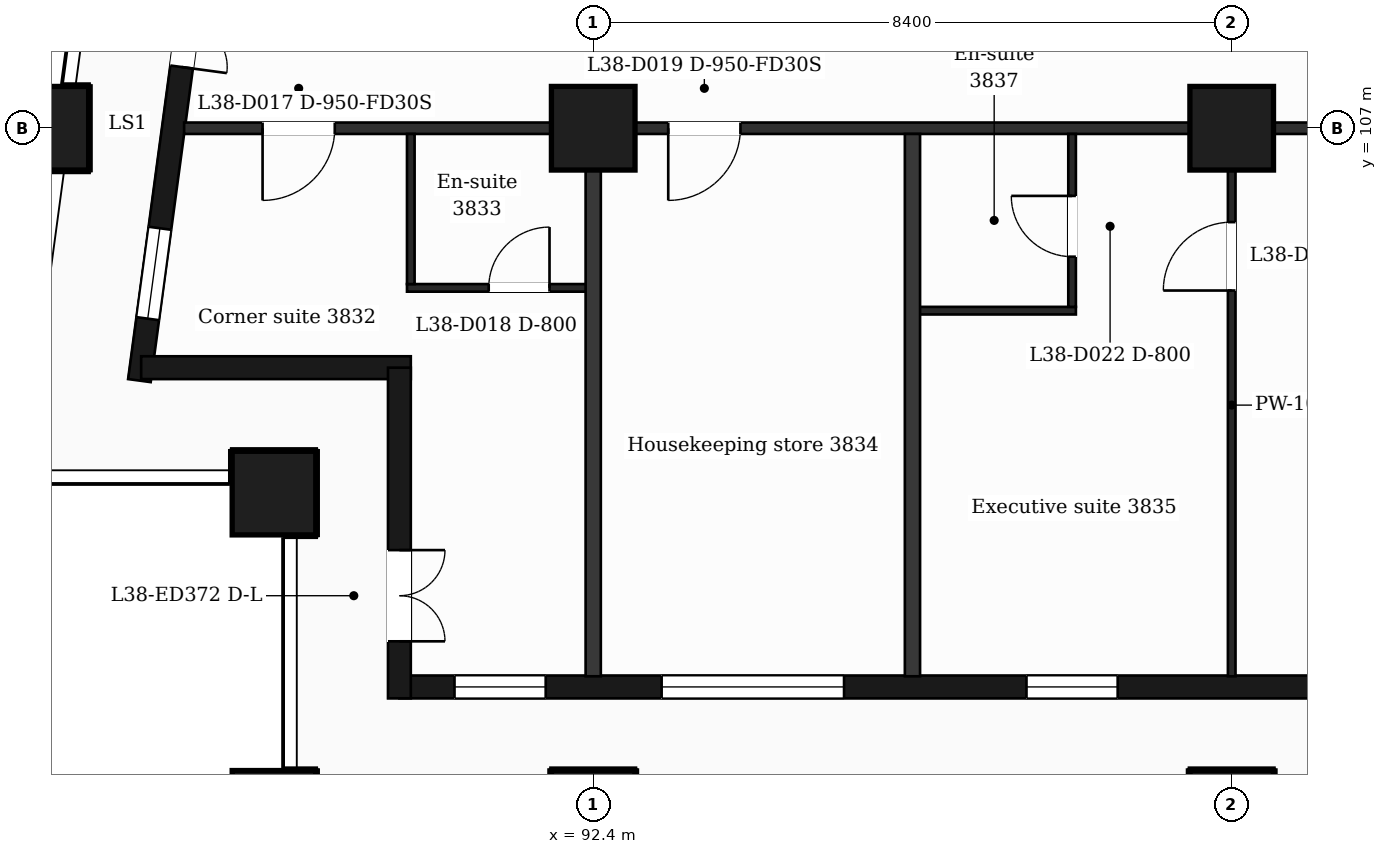
"""IFC4 building model, lengths in metres.
Left out: names, types, materials, properties, quantities, classifications, styles, units other than length and angle.
Written with IfcOpenShell. Run it as: python <this file> out.ifc"""

import sys

from ifc_helpers import new_model, si_unit, direction, frame, frame_2d, origin, origin_2d, place, context, subcontext, project, spatial, rectangle, extrude, element, fill, save


model = new_model("IFC4")
c1 = context("Model", 3, precision=1e-05, world=origin(), true_north=direction((0.0, 1.0)))
c2 = subcontext(c1, "Body", "Model", "MODEL_VIEW")
j1 = project(units=[si_unit("LENGTHUNIT", "METRE"), si_unit("PLANEANGLEUNIT", "RADIAN")], contexts=[c1])
p1 = place(None, origin())
s1 = spatial("IfcSite", under=j1, at=p1, CompositionType="ELEMENT")
p2 = place(p1, origin())
s2 = spatial("IfcBuilding", under=s1, at=p2, CompositionType="ELEMENT")
p3 = place(p2, frame((0.0, 0.0, 162.6)))
s3 = spatial("IfcBuildingStorey", under=s2, at=p3, CompositionType="ELEMENT", Elevation=162.6)
for number, where, z_axis, x_axis in (
    (1, (92.4, 98.0, 0.0), (0.0, 0.0, 1.0), (1.0, 0.0, 0.0)),
    (2, (100.8, 98.0, 0.0), (0.0, 0.0, 1.0), (1.0, 0.0, 0.0)),
    (3, (88.2, 98.0, 0.0), (0.0, 0.0, 1.0), (1.0, 0.0, 0.0)),
    (4, (88.2, 102.2, 0.0), (0.0, 0.0, 1.0), (1.0, 0.0, 0.0)),
    (5, (92.4, 107.0, 0.0), (0.0, 0.0, 1.0), (1.0, 0.0, 0.0)),
    (6, (100.8, 107.0, 0.0), (0.0, 0.0, 1.0), (1.0, 0.0, 0.0)),
    (7, (85.211, 107.0, 0.0), (0.0, 0.0, 1.0), (1.0, 0.0, 0.0)),
):
    element("IfcColumn", number, at=place(p3, frame(where, z_axis=z_axis, x_axis=x_axis)), inside=s3, PredefinedType="COLUMN", context=c2, shape_type="SweptSolid", body=[
        extrude(rectangle(XDim=1.1, YDim=1.1, at=origin_2d()), origin(), (0.0, 0.0, 1.0), 3.7),
    ])
p4 = place(p3, frame((89.85, 99.65, 0.0), z_axis=(0.0, 0.0, 1.0), x_axis=(1.0, 0.0, 0.0)))
e8 = element("IfcWall", 8, at=p4, inside=s3, PredefinedType="SOLIDWALL", context=c2, shape_type="SweptSolid", body=[
    extrude(rectangle(XDim=47.25, YDim=0.3, at=frame_2d((23.625, 0.0))), origin(), (0.0, 0.0, 1.0), 3.38),
])
p5 = place(p4, frame((0.725, 0.0, 0.9)))
e9 = element("IfcOpeningElement", 9, at=p5, cuts=e8, PredefinedType="OPENING", context=c2, shape_type="SweptSolid", body=[
    extrude(rectangle(XDim=1.2, YDim=2.1, at=frame_2d((0.6, 1.05))), frame((0.0, 0.16, 0.0), z_axis=(0.0, -1.0, 0.0), x_axis=(1.0, 0.0, 0.0)), (0.0, 0.0, 1.0), 0.32),
])
p6 = place(p4, frame((3.45, 0.0, 0.9)))
e10 = element("IfcOpeningElement", 10, at=p6, cuts=e8, PredefinedType="OPENING", context=c2, shape_type="SweptSolid", body=[
    extrude(rectangle(XDim=2.4, YDim=2.1, at=frame_2d((1.2, 1.05))), frame((0.0, 0.16, 0.0), z_axis=(0.0, -1.0, 0.0), x_axis=(1.0, 0.0, 0.0)), (0.0, 0.0, 1.0), 0.32),
])
p7 = place(p4, frame((8.25, 0.0, 0.9)))
e11 = element("IfcOpeningElement", 11, at=p7, cuts=e8, PredefinedType="OPENING", context=c2, shape_type="SweptSolid", body=[
    extrude(rectangle(XDim=1.2, YDim=2.1, at=frame_2d((0.6, 1.05))), frame((0.0, 0.16, 0.0), z_axis=(0.0, -1.0, 0.0), x_axis=(1.0, 0.0, 0.0)), (0.0, 0.0, 1.0), 0.32),
])
p8 = place(p4, frame((12.45, 0.0, 0.9)))
e12 = element("IfcOpeningElement", 12, at=p8, cuts=e8, PredefinedType="OPENING", context=c2, shape_type="SweptSolid", body=[
    extrude(rectangle(XDim=1.2, YDim=2.1, at=frame_2d((0.6, 1.05))), frame((0.0, 0.16, 0.0), z_axis=(0.0, -1.0, 0.0), x_axis=(1.0, 0.0, 0.0)), (0.0, 0.0, 1.0), 0.32),
])
p9 = place(p4, frame((16.05, 0.0, 0.9)))
e13 = element("IfcOpeningElement", 13, at=p9, cuts=e8, PredefinedType="OPENING", context=c2, shape_type="SweptSolid", body=[
    extrude(rectangle(XDim=2.4, YDim=2.1, at=frame_2d((1.2, 1.05))), frame((0.0, 0.16, 0.0), z_axis=(0.0, -1.0, 0.0), x_axis=(1.0, 0.0, 0.0)), (0.0, 0.0, 1.0), 0.32),
])
p10 = place(p4, frame((20.25, 0.0, 0.9)))
e14 = element("IfcOpeningElement", 14, at=p10, cuts=e8, PredefinedType="OPENING", context=c2, shape_type="SweptSolid", body=[
    extrude(rectangle(XDim=2.4, YDim=2.1, at=frame_2d((1.2, 1.05))), frame((0.0, 0.16, 0.0), z_axis=(0.0, -1.0, 0.0), x_axis=(1.0, 0.0, 0.0)), (0.0, 0.0, 1.0), 0.32),
])
p11 = place(p4, frame((25.05, 0.0, 0.0)))
e15 = element("IfcOpeningElement", 15, at=p11, cuts=e8, PredefinedType="OPENING", context=c2, shape_type="SweptSolid", body=[
    extrude(rectangle(XDim=1.2, YDim=2.4, at=frame_2d((0.6, 1.2))), frame((0.0, 0.16, 0.0), z_axis=(0.0, -1.0, 0.0), x_axis=(1.0, 0.0, 0.0)), (0.0, 0.0, 1.0), 0.32),
])
p12 = place(p4, frame((28.65, 0.0, 0.9)))
e16 = element("IfcOpeningElement", 16, at=p12, cuts=e8, PredefinedType="OPENING", context=c2, shape_type="SweptSolid", body=[
    extrude(rectangle(XDim=2.4, YDim=2.1, at=frame_2d((1.2, 1.05))), frame((0.0, 0.16, 0.0), z_axis=(0.0, -1.0, 0.0), x_axis=(1.0, 0.0, 0.0)), (0.0, 0.0, 1.0), 0.32),
])
p13 = place(p4, frame((32.85, 0.0, 0.9)))
e17 = element("IfcOpeningElement", 17, at=p13, cuts=e8, PredefinedType="OPENING", context=c2, shape_type="SweptSolid", body=[
    extrude(rectangle(XDim=2.4, YDim=2.1, at=frame_2d((1.2, 1.05))), frame((0.0, 0.16, 0.0), z_axis=(0.0, -1.0, 0.0), x_axis=(1.0, 0.0, 0.0)), (0.0, 0.0, 1.0), 0.32),
])
p14 = place(p4, frame((37.65, 0.0, 0.9)))
e18 = element("IfcOpeningElement", 18, at=p14, cuts=e8, PredefinedType="OPENING", context=c2, shape_type="SweptSolid", body=[
    extrude(rectangle(XDim=1.2, YDim=2.1, at=frame_2d((0.6, 1.05))), frame((0.0, 0.16, 0.0), z_axis=(0.0, -1.0, 0.0), x_axis=(1.0, 0.0, 0.0)), (0.0, 0.0, 1.0), 0.32),
])
p15 = place(p4, frame((41.85, 0.0, 0.9)))
e19 = element("IfcOpeningElement", 19, at=p15, cuts=e8, PredefinedType="OPENING", context=c2, shape_type="SweptSolid", body=[
    extrude(rectangle(XDim=1.2, YDim=2.1, at=frame_2d((0.6, 1.05))), frame((0.0, 0.16, 0.0), z_axis=(0.0, -1.0, 0.0), x_axis=(1.0, 0.0, 0.0)), (0.0, 0.0, 1.0), 0.32),
])
p16 = place(p4, frame((45.25, 0.0, 0.9)))
e20 = element("IfcOpeningElement", 20, at=p16, cuts=e8, PredefinedType="OPENING", context=c2, shape_type="SweptSolid", body=[
    extrude(rectangle(XDim=1.2, YDim=2.1, at=frame_2d((0.6, 1.05))), frame((0.0, 0.16, 0.0), z_axis=(0.0, -1.0, 0.0), x_axis=(1.0, 0.0, 0.0)), (0.0, 0.0, 1.0), 0.32),
])
p17 = place(p3, frame((87.334, 110.4, 0.0), z_axis=(0.0, 0.0, 1.0), x_axis=(-0.133437175554, -0.991057273915, 0.0)))
e21 = element("IfcWall", 21, at=p17, inside=s3, PredefinedType="SOLIDWALL", context=c2, shape_type="SweptSolid", body=[
    extrude(rectangle(XDim=6.781, YDim=0.3, at=frame_2d((3.39, 0.0))), origin(), (0.0, 0.0, 1.0), 3.38),
])
p18 = place(p17, frame((1.418, 0.0, 0.0)))
e22 = element("IfcOpeningElement", 22, at=p18, cuts=e21, PredefinedType="OPENING", context=c2, shape_type="SweptSolid", body=[
    extrude(rectangle(XDim=1.2, YDim=2.4, at=frame_2d((0.6, 1.2))), frame((0.0, 0.16, 0.0), z_axis=(0.0, -1.0, 0.0), x_axis=(1.0, 0.0, 0.0)), (0.0, 0.0, 1.0), 0.32),
])
p19 = place(p17, frame((4.758, 0.0, 0.9)))
e23 = element("IfcOpeningElement", 23, at=p19, cuts=e21, PredefinedType="OPENING", context=c2, shape_type="SweptSolid", body=[
    extrude(rectangle(XDim=1.2, YDim=2.1, at=frame_2d((0.6, 1.05))), frame((0.0, 0.16, 0.0), z_axis=(0.0, -1.0, 0.0), x_axis=(1.0, 0.0, 0.0)), (0.0, 0.0, 1.0), 0.32),
])
p20 = place(p3, frame((86.452, 103.85, 0.0), z_axis=(0.0, 0.0, 1.0), x_axis=(1.0, 0.0, 0.0)))
e24 = element("IfcWall", 24, at=p20, inside=s3, PredefinedType="SOLIDWALL", context=c2, shape_type="SweptSolid", body=[
    extrude(rectangle(XDim=3.548, YDim=0.3, at=frame_2d((1.774, 0.0))), origin(), (0.0, 0.0, 1.0), 3.38),
])
p21 = place(p3, frame((89.85, 103.85, 0.0), z_axis=(0.0, 0.0, 1.0), x_axis=(0.0, -1.0, 0.0)))
e25 = element("IfcWall", 25, at=p21, inside=s3, PredefinedType="SOLIDWALL", context=c2, shape_type="SweptSolid", body=[
    extrude(rectangle(XDim=4.35, YDim=0.3, at=frame_2d((2.175, 0.0))), origin(), (0.0, 0.0, 1.0), 3.38),
])
p22 = place(p21, frame((2.4, 0.0, 0.0)))
e26 = element("IfcOpeningElement", 26, at=p22, cuts=e25, PredefinedType="OPENING", context=c2, shape_type="SweptSolid", body=[
    extrude(rectangle(XDim=1.2, YDim=2.4, at=frame_2d((0.6, 1.2))), frame((0.0, 0.16, 0.0), z_axis=(0.0, -1.0, 0.0), x_axis=(1.0, 0.0, 0.0)), (0.0, 0.0, 1.0), 0.32),
])
p23 = place(p3, frame((96.6, 104.6, 0.0), z_axis=(0.0, 0.0, 1.0), x_axis=(1.0, 0.0, 0.0)))
e27 = element("IfcWall", 27, at=p23, inside=s3, PredefinedType="PARTITIONING", context=c2, shape_type="SweptSolid", body=[
    extrude(rectangle(XDim=2.15, YDim=0.1, at=frame_2d((1.075, 0.0))), origin(), (0.0, 0.0, 1.0), 3.38),
])
p24 = place(p3, frame((89.95, 104.9, 0.0), z_axis=(0.0, 0.0, 1.0), x_axis=(1.0, 0.0, 0.0)))
e28 = element("IfcWall", 28, at=p24, inside=s3, PredefinedType="PARTITIONING", context=c2, shape_type="SweptSolid", body=[
    extrude(rectangle(XDim=2.45, YDim=0.1, at=frame_2d((1.225, 0.0))), origin(), (0.0, 0.0, 1.0), 3.38),
])
p25 = place(p24, frame((1.075, 0.0, 0.0)))
e29 = element("IfcOpeningElement", 29, at=p25, cuts=e28, PredefinedType="OPENING", context=c2, shape_type="SweptSolid", body=[
    extrude(rectangle(XDim=0.8, YDim=2.1, at=frame_2d((0.4, 1.05))), frame((0.0, 0.06, 0.0), z_axis=(0.0, -1.0, 0.0), x_axis=(1.0, 0.0, 0.0)), (0.0, 0.0, 1.0), 0.12),
])
p26 = place(p3, frame((87.018, 107.0, 0.0), z_axis=(0.0, 0.0, 1.0), x_axis=(1.0, 0.0, 0.0)))
e30 = element("IfcWall", 30, at=p26, inside=s3, PredefinedType="PARTITIONING", context=c2, shape_type="SweptSolid", body=[
    extrude(rectangle(XDim=52.765, YDim=0.15, at=frame_2d((26.382, 0.0))), origin(), (0.0, 0.0, 1.0), 3.38),
])
p27 = place(p26, frame((1.032, 0.0, 0.0)))
e31 = element("IfcOpeningElement", 31, at=p27, cuts=e30, PredefinedType="OPENING", context=c2, shape_type="SweptSolid", body=[
    extrude(rectangle(XDim=0.95, YDim=2.1, at=frame_2d((0.475, 1.05))), frame((0.0, 0.085, 0.0), z_axis=(0.0, -1.0, 0.0), x_axis=(1.0, 0.0, 0.0)), (0.0, 0.0, 1.0), 0.17),
])
p28 = place(p26, frame((6.369, 0.0, 0.0)))
e32 = element("IfcOpeningElement", 32, at=p28, cuts=e30, PredefinedType="OPENING", context=c2, shape_type="SweptSolid", body=[
    extrude(rectangle(XDim=0.95, YDim=2.1, at=frame_2d((0.475, 1.05))), frame((0.0, 0.085, 0.0), z_axis=(0.0, -1.0, 0.0), x_axis=(1.0, 0.0, 0.0)), (0.0, 0.0, 1.0), 0.17),
])
p29 = place(p26, frame((16.812, 0.0, 0.0)))
e33 = element("IfcOpeningElement", 33, at=p29, cuts=e30, PredefinedType="OPENING", context=c2, shape_type="SweptSolid", body=[
    extrude(rectangle(XDim=1.0, YDim=2.1, at=frame_2d((0.5, 1.05))), frame((0.0, 0.085, 0.0), z_axis=(0.0, -1.0, 0.0), x_axis=(1.0, 0.0, 0.0)), (0.0, 0.0, 1.0), 0.17),
])
p30 = place(p26, frame((25.157, 0.0, 0.0)))
e34 = element("IfcOpeningElement", 34, at=p30, cuts=e30, PredefinedType="OPENING", context=c2, shape_type="SweptSolid", body=[
    extrude(rectangle(XDim=0.95, YDim=2.1, at=frame_2d((0.475, 1.05))), frame((0.0, 0.085, 0.0), z_axis=(0.0, -1.0, 0.0), x_axis=(1.0, 0.0, 0.0)), (0.0, 0.0, 1.0), 0.17),
])
p31 = place(p26, frame((28.867, 0.0, 0.0)))
e35 = element("IfcOpeningElement", 35, at=p31, cuts=e30, PredefinedType="OPENING", context=c2, shape_type="SweptSolid", body=[
    extrude(rectangle(XDim=0.95, YDim=2.1, at=frame_2d((0.475, 1.05))), frame((0.0, 0.085, 0.0), z_axis=(0.0, -1.0, 0.0), x_axis=(1.0, 0.0, 0.0)), (0.0, 0.0, 1.0), 0.17),
])
p32 = place(p26, frame((34.952, 0.0, 0.0)))
e36 = element("IfcOpeningElement", 36, at=p32, cuts=e30, PredefinedType="OPENING", context=c2, shape_type="SweptSolid", body=[
    extrude(rectangle(XDim=1.0, YDim=2.1, at=frame_2d((0.5, 1.05))), frame((0.0, 0.085, 0.0), z_axis=(0.0, -1.0, 0.0), x_axis=(1.0, 0.0, 0.0)), (0.0, 0.0, 1.0), 0.17),
])
p33 = place(p26, frame((45.632, 0.0, 0.0)))
e37 = element("IfcOpeningElement", 37, at=p33, cuts=e30, PredefinedType="OPENING", context=c2, shape_type="SweptSolid", body=[
    extrude(rectangle(XDim=0.95, YDim=2.1, at=frame_2d((0.475, 1.05))), frame((0.0, 0.085, 0.0), z_axis=(0.0, -1.0, 0.0), x_axis=(1.0, 0.0, 0.0)), (0.0, 0.0, 1.0), 0.17),
])
p34 = place(p26, frame((48.56, 0.0, 0.0)))
e38 = element("IfcOpeningElement", 38, at=p34, cuts=e30, PredefinedType="OPENING", context=c2, shape_type="SweptSolid", body=[
    extrude(rectangle(XDim=0.95, YDim=2.1, at=frame_2d((0.475, 1.05))), frame((0.0, 0.085, 0.0), z_axis=(0.0, -1.0, 0.0), x_axis=(1.0, 0.0, 0.0)), (0.0, 0.0, 1.0), 0.17),
])
p35 = place(p3, frame((90.0, 104.95, 0.0), z_axis=(0.0, 0.0, 1.0), x_axis=(0.0, 1.0, 0.0)))
e39 = element("IfcWall", 39, at=p35, inside=s3, PredefinedType="PARTITIONING", context=c2, shape_type="SweptSolid", body=[
    extrude(rectangle(XDim=1.975, YDim=0.1, at=frame_2d((0.988, 0.0))), origin(), (0.0, 0.0, 1.0), 3.38),
])
for number, where, z_axis, x_axis in (
    (40, (92.4, 99.79, 0.0), (0.0, 0.0, 1.0), (0.0, 1.0, 0.0)),
    (41, (96.6, 99.79, 0.0), (0.0, 0.0, 1.0), (0.0, 1.0, 0.0)),
):
    element("IfcWall", number, at=place(p3, frame(where, z_axis=z_axis, x_axis=x_axis)), inside=s3, PredefinedType="PARTITIONING", context=c2, shape_type="SweptSolid", body=[
        extrude(rectangle(XDim=7.135, YDim=0.2, at=frame_2d((3.567, 0.0))), origin(), (0.0, 0.0, 1.0), 3.38),
    ])
p36 = place(p3, frame((98.7, 104.65, 0.0), z_axis=(0.0, 0.0, 1.0), x_axis=(0.0, 1.0, 0.0)))
e42 = element("IfcWall", 42, at=p36, inside=s3, PredefinedType="PARTITIONING", context=c2, shape_type="SweptSolid", body=[
    extrude(rectangle(XDim=2.275, YDim=0.1, at=frame_2d((1.138, 0.0))), origin(), (0.0, 0.0, 1.0), 3.38),
])
p37 = place(p36, frame((0.66, 0.0, 0.0)))
e43 = element("IfcOpeningElement", 43, at=p37, cuts=e42, PredefinedType="OPENING", context=c2, shape_type="SweptSolid", body=[
    extrude(rectangle(XDim=0.8, YDim=2.1, at=frame_2d((0.4, 1.05))), frame((0.0, 0.06, 0.0), z_axis=(0.0, -1.0, 0.0), x_axis=(1.0, 0.0, 0.0)), (0.0, 0.0, 1.0), 0.12),
])
p38 = place(p3, frame((100.8, 99.79, 0.0), z_axis=(0.0, 0.0, 1.0), x_axis=(0.0, 1.0, 0.0)))
e44 = element("IfcWall", 44, at=p38, inside=s3, PredefinedType="PARTITIONING", context=c2, shape_type="SweptSolid", body=[
    extrude(rectangle(XDim=7.135, YDim=0.1, at=frame_2d((3.567, 0.0))), origin(), (0.0, 0.0, 1.0), 3.38),
])
p39 = place(p38, frame((5.075, 0.0, 0.0)))
e45 = element("IfcOpeningElement", 45, at=p39, cuts=e44, PredefinedType="OPENING", context=c2, shape_type="SweptSolid", body=[
    extrude(rectangle(XDim=0.9, YDim=2.1, at=frame_2d((0.45, 1.05))), frame((0.0, 0.06, 0.0), z_axis=(0.0, -1.0, 0.0), x_axis=(1.0, 0.0, 0.0)), (0.0, 0.0, 1.0), 0.12),
])
p40 = place(p5, origin())
e46 = element("IfcWindow", 46, at=p40, inside=s3, PartitioningType="SINGLE_PANEL", PredefinedType="WINDOW", context=c2, shape_type="SweptSolid", body=[
    extrude(rectangle(XDim=1.2, YDim=2.1, at=frame_2d((0.6, 1.05))), frame((0.0, 0.03, 0.0), z_axis=(0.0, -1.0, 0.0), x_axis=(1.0, 0.0, 0.0)), (0.0, 0.0, 1.0), 0.06),
])
fill(e9, e46)
p41 = place(p6, origin())
e47 = element("IfcWindow", 47, at=p41, inside=s3, PartitioningType="SINGLE_PANEL", PredefinedType="WINDOW", context=c2, shape_type="SweptSolid", body=[
    extrude(rectangle(XDim=2.4, YDim=2.1, at=frame_2d((1.2, 1.05))), frame((0.0, 0.03, 0.0), z_axis=(0.0, -1.0, 0.0), x_axis=(1.0, 0.0, 0.0)), (0.0, 0.0, 1.0), 0.06),
])
fill(e10, e47)
p42 = place(p7, origin())
e48 = element("IfcWindow", 48, at=p42, inside=s3, PartitioningType="SINGLE_PANEL", PredefinedType="WINDOW", context=c2, shape_type="SweptSolid", body=[
    extrude(rectangle(XDim=1.2, YDim=2.1, at=frame_2d((0.6, 1.05))), frame((0.0, 0.03, 0.0), z_axis=(0.0, -1.0, 0.0), x_axis=(1.0, 0.0, 0.0)), (0.0, 0.0, 1.0), 0.06),
])
fill(e11, e48)
p43 = place(p18, origin())
e49 = element("IfcDoor", 49, at=p43, inside=s3, OperationType="DOUBLE_DOOR_SINGLE_SWING", PredefinedType="DOOR", context=c2, shape_type="SweptSolid", body=[
    extrude(rectangle(XDim=1.2, YDim=2.4, at=frame_2d((0.6, 1.2))), frame((0.0, 0.025, 0.0), z_axis=(0.0, -1.0, 0.0), x_axis=(1.0, 0.0, 0.0)), (0.0, 0.0, 1.0), 0.05),
])
fill(e22, e49)
p44 = place(p19, origin())
e50 = element("IfcWindow", 50, at=p44, inside=s3, PartitioningType="SINGLE_PANEL", PredefinedType="WINDOW", context=c2, shape_type="SweptSolid", body=[
    extrude(rectangle(XDim=1.2, YDim=2.1, at=frame_2d((0.6, 1.05))), frame((0.0, 0.03, 0.0), z_axis=(0.0, -1.0, 0.0), x_axis=(1.0, 0.0, 0.0)), (0.0, 0.0, 1.0), 0.06),
])
fill(e23, e50)
p45 = place(p22, origin())
e51 = element("IfcDoor", 51, at=p45, inside=s3, OperationType="DOUBLE_DOOR_SINGLE_SWING", PredefinedType="DOOR", context=c2, shape_type="SweptSolid", body=[
    extrude(rectangle(XDim=1.2, YDim=2.4, at=frame_2d((0.6, 1.2))), frame((0.0, 0.025, 0.0), z_axis=(0.0, -1.0, 0.0), x_axis=(1.0, 0.0, 0.0)), (0.0, 0.0, 1.0), 0.05),
])
fill(e26, e51)
p46 = place(p27, origin())
e52 = element("IfcDoor", 52, at=p46, inside=s3, OperationType="SINGLE_SWING_LEFT", PredefinedType="DOOR", context=c2, shape_type="SweptSolid", body=[
    extrude(rectangle(XDim=0.95, YDim=2.1, at=frame_2d((0.475, 1.05))), frame((0.0, 0.025, 0.0), z_axis=(0.0, -1.0, 0.0), x_axis=(1.0, 0.0, 0.0)), (0.0, 0.0, 1.0), 0.05),
])
fill(e31, e52)
p47 = place(p25, origin())
e53 = element("IfcDoor", 53, at=p47, inside=s3, OperationType="SINGLE_SWING_RIGHT", PredefinedType="DOOR", context=c2, shape_type="SweptSolid", body=[
    extrude(rectangle(XDim=0.8, YDim=2.1, at=frame_2d((0.4, 1.05))), frame((0.0, 0.025, 0.0), z_axis=(0.0, -1.0, 0.0), x_axis=(1.0, 0.0, 0.0)), (0.0, 0.0, 1.0), 0.05),
])
fill(e29, e53)
p48 = place(p28, origin())
e54 = element("IfcDoor", 54, at=p48, inside=s3, OperationType="SINGLE_SWING_LEFT", PredefinedType="DOOR", context=c2, shape_type="SweptSolid", body=[
    extrude(rectangle(XDim=0.95, YDim=2.1, at=frame_2d((0.475, 1.05))), frame((0.0, 0.025, 0.0), z_axis=(0.0, -1.0, 0.0), x_axis=(1.0, 0.0, 0.0)), (0.0, 0.0, 1.0), 0.05),
])
fill(e32, e54)
p49 = place(p39, origin())
e55 = element("IfcDoor", 55, at=p49, inside=s3, OperationType="SINGLE_SWING_LEFT", PredefinedType="DOOR", context=c2, shape_type="SweptSolid", body=[
    extrude(rectangle(XDim=0.9, YDim=2.1, at=frame_2d((0.45, 1.05))), frame((0.0, 0.025, 0.0), z_axis=(0.0, -1.0, 0.0), x_axis=(1.0, 0.0, 0.0)), (0.0, 0.0, 1.0), 0.05),
])
fill(e45, e55)
p50 = place(p37, origin())
e56 = element("IfcDoor", 56, at=p50, inside=s3, OperationType="SINGLE_SWING_RIGHT", PredefinedType="DOOR", context=c2, shape_type="SweptSolid", body=[
    extrude(rectangle(XDim=0.8, YDim=2.1, at=frame_2d((0.4, 1.05))), frame((0.0, 0.025, 0.0), z_axis=(0.0, -1.0, 0.0), x_axis=(1.0, 0.0, 0.0)), (0.0, 0.0, 1.0), 0.05),
])
fill(e43, e56)
save(model, sys.argv[1])
